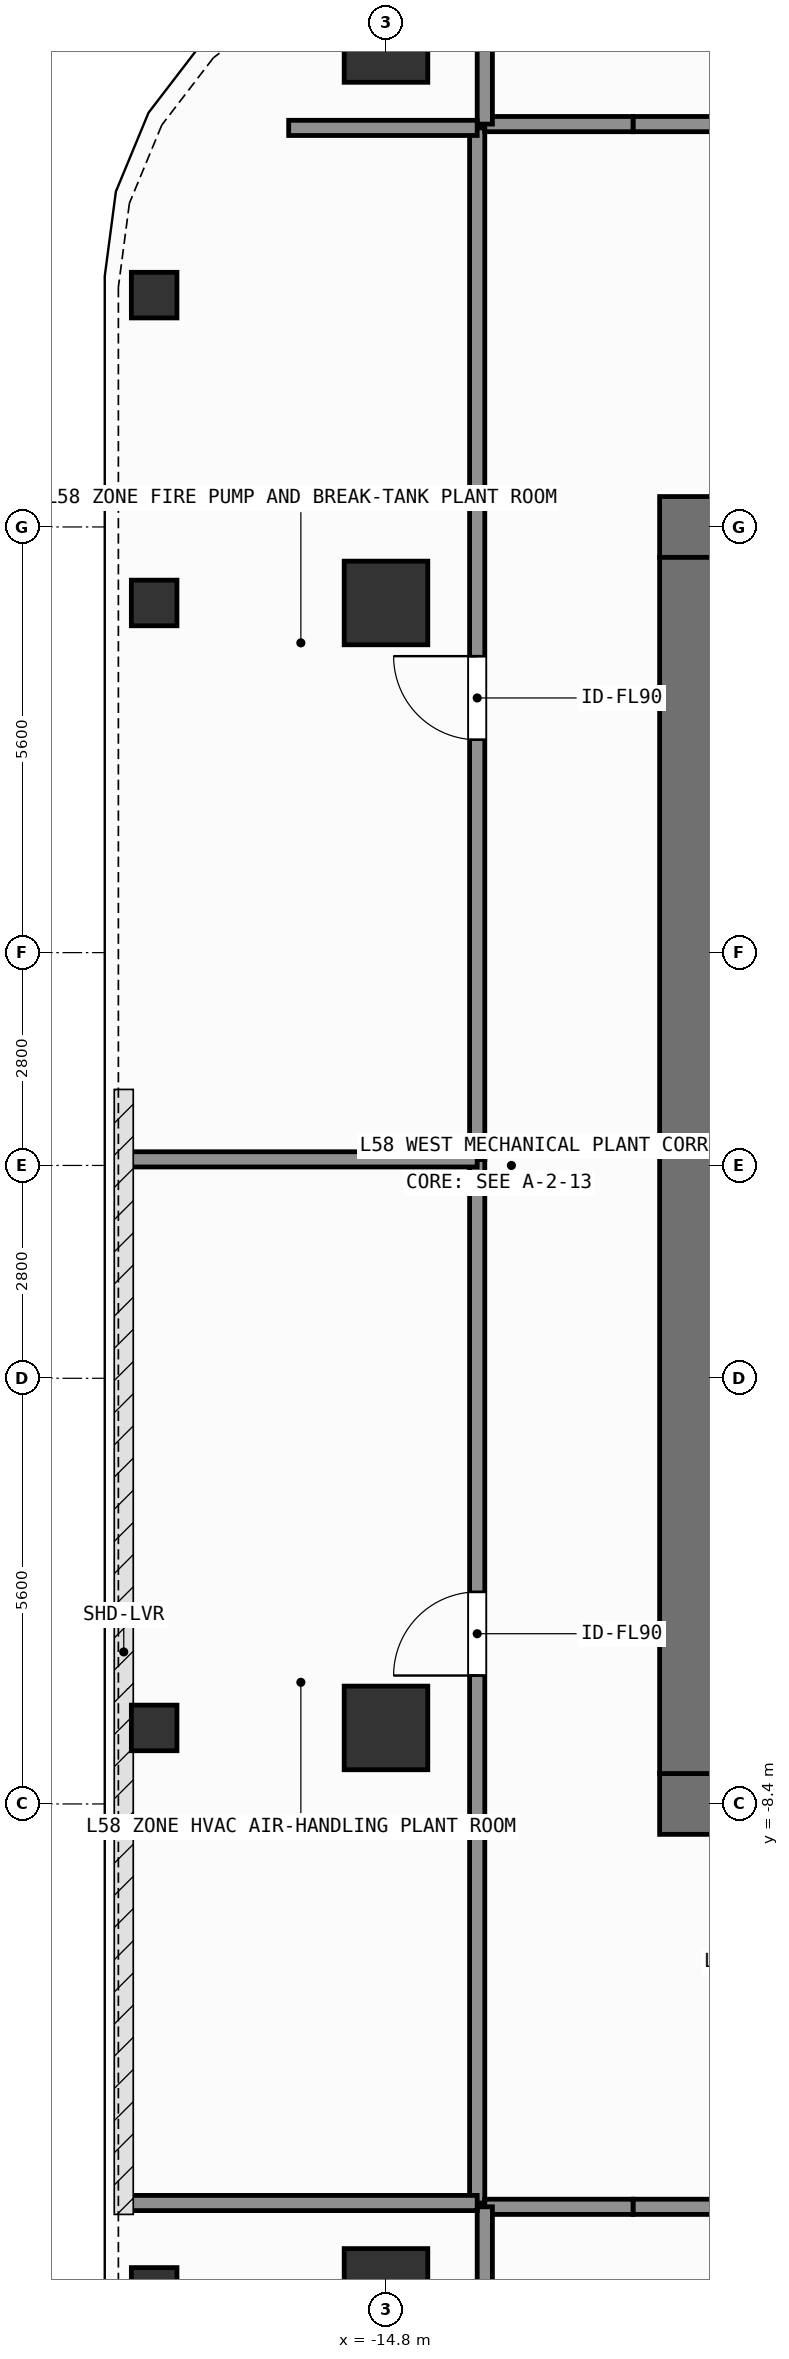
"""IFC4 building model, lengths in metres.
Left out: names, types, materials, properties, quantities, classifications, styles, units other than length and angle.
Written with IfcOpenShell. Run it as: python <this file> out.ifc"""

import sys

from ifc_helpers import new_model, si_unit, direction, frame, frame_2d, origin, origin_2d, place, context, subcontext, project, spatial, rectangle, hollow_rectangle, extrude, element, fill, save


model = new_model("IFC4")
c1 = context("Model", 3, precision=1e-05, world=origin(), true_north=direction((0.0, 1.0)))
c2 = subcontext(c1, "Body", "Model", "MODEL_VIEW")
j1 = project(units=[si_unit("LENGTHUNIT", "METRE"), si_unit("PLANEANGLEUNIT", "RADIAN")], contexts=[c1])
p1 = place(None, origin())
s1 = spatial("IfcSite", under=j1, at=p1, CompositionType="ELEMENT")
p2 = place(p1, origin())
s2 = spatial("IfcBuilding", under=s1, at=p2, CompositionType="ELEMENT")
p3 = place(p2, frame((0.0, 0.0, 235.2)))
s3 = spatial("IfcBuildingStorey", under=s2, at=p3, CompositionType="ELEMENT", Elevation=235.2)
for number, where, z_axis, x_axis in (
    (1, (-11.2, -8.4, 0.0), (0.0, 0.0, 1.0), (1.0, 0.0, 0.0)),
    (2, (-11.2, 8.4, 0.0), (0.0, 0.0, 1.0), (1.0, 0.0, 0.0)),
):
    element("IfcWall", number, at=place(p3, frame(where, z_axis=z_axis, x_axis=x_axis)), inside=s3, PredefinedType="SHEAR", context=c2, shape_type="SweptSolid", body=[
        extrude(rectangle(XDim=1.5, YDim=0.8, at=frame_2d((0.75, 0.0))), origin(), (0.0, 0.0, 1.0), 7.8),
    ])
p4 = place(p3, frame((-10.8, -8.0, 0.0), z_axis=(0.0, 0.0, 1.0), x_axis=(0.0, 1.0, 0.0)))
e3 = element("IfcWall", 3, at=p4, inside=s3, PredefinedType="SHEAR", context=c2, shape_type="SweptSolid", body=[
    extrude(rectangle(XDim=16.0, YDim=0.8, at=frame_2d((8.0, 0.0))), origin(), (0.0, 0.0, 1.0), 7.8),
])
for number, where, z_axis, x_axis in (
    (4, (-14.8, -14.8, 0.0), (0.0, 0.0, 1.0), (1.0, 0.0, 0.0)),
    (5, (-14.8, 14.8, 0.0), (0.0, 0.0, 1.0), (1.0, 0.0, 0.0)),
    (6, (-14.8, -7.4, 0.0), (0.0, 0.0, 1.0), (1.0, 0.0, 0.0)),
    (7, (-14.8, 7.4, 0.0), (0.0, 0.0, 1.0), (1.0, 0.0, 0.0)),
):
    element("IfcColumn", number, at=place(p3, frame(where, z_axis=z_axis, x_axis=x_axis)), inside=s3, PredefinedType="COLUMN", context=c2, shape_type="SweptSolid", body=[
        extrude(rectangle(XDim=1.1, YDim=1.1, at=origin_2d()), origin(), (0.0, 0.0, 1.0), 7.8),
    ])
for number, where, z_axis, x_axis in (
    (8, (-17.85, 11.45, 0.0), (0.0, 0.0, 1.0), (1.0, 0.0, 0.0)),
    (9, (-17.85, -14.8, 0.0), (0.0, 0.0, 1.0), (1.0, 0.0, 0.0)),
    (10, (-17.85, -7.4, 0.0), (0.0, 0.0, 1.0), (1.0, 0.0, 0.0)),
    (11, (-17.85, 7.4, 0.0), (0.0, 0.0, 1.0), (1.0, 0.0, 0.0)),
):
    element("IfcColumn", number, at=place(p3, frame(where, z_axis=z_axis, x_axis=x_axis)), inside=s3, PredefinedType="COLUMN", context=c2, shape_type="SweptSolid", body=[
        extrude(hollow_rectangle(XDim=0.6, YDim=0.6, WallThickness=0.028, at=origin_2d()), origin(), (0.0, 0.0, 1.0), 7.8),
    ])
p5 = place(p3, frame((-11.55, -13.7, 0.0), z_axis=(0.0, 0.0, 1.0), x_axis=(1.0, 0.0, 0.0)))
e12 = element("IfcWall", 12, at=p5, inside=s3, PredefinedType="SOLIDWALL", context=c2, shape_type="SweptSolid", body=[
    extrude(rectangle(XDim=27.15, YDim=0.2, at=frame_2d((13.575, 0.0))), origin(), (0.0, 0.0, 1.0), 7.58),
])
p6 = place(p5, frame((9.114, 0.0, 0.0)))
e13 = element("IfcOpeningElement", 13, at=p6, cuts=e12, PredefinedType="OPENING", context=c2, shape_type="SweptSolid", body=[
    extrude(rectangle(XDim=1.4, YDim=2.2, at=frame_2d((0.7, 1.1))), frame((0.0, 0.11, 0.0), z_axis=(0.0, -1.0, 0.0), x_axis=(1.0, 0.0, 0.0)), (0.0, 0.0, 1.0), 0.22),
])
p7 = place(p3, frame((-11.55, 13.7, 0.0), z_axis=(0.0, 0.0, 1.0), x_axis=(1.0, 0.0, 0.0)))
e14 = element("IfcWall", 14, at=p7, inside=s3, PredefinedType="SOLIDWALL", context=c2, shape_type="SweptSolid", body=[
    extrude(rectangle(XDim=27.15, YDim=0.2, at=frame_2d((13.575, 0.0))), origin(), (0.0, 0.0, 1.0), 7.58),
])
p8 = place(p7, frame((9.114, 0.0, 0.0)))
e15 = element("IfcOpeningElement", 15, at=p8, cuts=e14, PredefinedType="OPENING", context=c2, shape_type="SweptSolid", body=[
    extrude(rectangle(XDim=1.4, YDim=2.2, at=frame_2d((0.7, 1.1))), frame((0.0, 0.11, 0.0), z_axis=(0.0, -1.0, 0.0), x_axis=(1.0, 0.0, 0.0)), (0.0, 0.0, 1.0), 0.22),
])
p9 = place(p3, frame((-13.6, -13.65, 0.0), z_axis=(0.0, 0.0, 1.0), x_axis=(0.0, 1.0, 0.0)))
e16 = element("IfcWall", 16, at=p9, inside=s3, PredefinedType="SOLIDWALL", context=c2, shape_type="SweptSolid", body=[
    extrude(rectangle(XDim=13.73, YDim=0.2, at=frame_2d((6.865, 0.0))), origin(), (0.0, 0.0, 1.0), 7.58),
])
p10 = place(p9, frame((6.939, 0.0, 0.0)))
e17 = element("IfcOpeningElement", 17, at=p10, cuts=e16, PredefinedType="OPENING", context=c2, shape_type="SweptSolid", body=[
    extrude(rectangle(XDim=1.1, YDim=2.15, at=frame_2d((0.55, 1.075))), frame((0.0, 0.11, 0.0), z_axis=(0.0, -1.0, 0.0), x_axis=(1.0, 0.0, 0.0)), (0.0, 0.0, 1.0), 0.22),
])
p11 = place(p3, frame((-13.6, 0.08, 0.0), z_axis=(0.0, 0.0, 1.0), x_axis=(0.0, 1.0, 0.0)))
e18 = element("IfcWall", 18, at=p11, inside=s3, PredefinedType="SOLIDWALL", context=c2, shape_type="SweptSolid", body=[
    extrude(rectangle(XDim=13.57, YDim=0.2, at=frame_2d((6.785, 0.0))), origin(), (0.0, 0.0, 1.0), 7.58),
])
p12 = place(p11, frame((5.52, 0.0, 0.0)))
e19 = element("IfcOpeningElement", 19, at=p12, cuts=e18, PredefinedType="OPENING", context=c2, shape_type="SweptSolid", body=[
    extrude(rectangle(XDim=1.1, YDim=2.15, at=frame_2d((0.55, 1.075))), frame((0.0, 0.11, 0.0), z_axis=(0.0, -1.0, 0.0), x_axis=(1.0, 0.0, 0.0)), (0.0, 0.0, 1.0), 0.22),
])
for number, where, z_axis, x_axis in (
    (20, (-13.5, -13.7, 0.0), (0.0, 0.0, 1.0), (1.0, 0.0, 0.0)),
    (21, (-13.5, 13.7, 0.0), (0.0, 0.0, 1.0), (1.0, 0.0, 0.0)),
):
    element("IfcWall", number, at=place(p3, frame(where, z_axis=z_axis, x_axis=x_axis)), inside=s3, PredefinedType="SOLIDWALL", context=c2, shape_type="SweptSolid", body=[
        extrude(rectangle(XDim=1.95, YDim=0.2, at=frame_2d((0.975, 0.0))), origin(), (0.0, 0.0, 1.0), 7.58),
    ])
p13 = place(p3, frame((-13.5, -28.55, 0.0), z_axis=(0.0, 0.0, 1.0), x_axis=(0.0, 1.0, 0.0)))
e22 = element("IfcWall", 22, at=p13, inside=s3, PredefinedType="SOLIDWALL", context=c2, shape_type="SweptSolid", body=[
    extrude(rectangle(XDim=14.85, YDim=0.2, at=frame_2d((7.425, 0.0))), origin(), (0.0, 0.0, 1.0), 7.58),
])
p14 = place(p3, frame((-13.5, 13.7, 0.0), z_axis=(0.0, 0.0, 1.0), x_axis=(0.0, 1.0, 0.0)))
e23 = element("IfcWall", 23, at=p14, inside=s3, PredefinedType="SOLIDWALL", context=c2, shape_type="SweptSolid", body=[
    extrude(rectangle(XDim=2.05, YDim=0.2, at=frame_2d((1.025, 0.0))), origin(), (0.0, 0.0, 1.0), 7.58),
])
p15 = place(p3, frame((-18.25, -13.65, 0.0), z_axis=(0.0, 0.0, 1.0), x_axis=(1.0, 0.0, 0.0)))
e24 = element("IfcWall", 24, at=p15, inside=s3, PredefinedType="SOLIDWALL", context=c2, shape_type="SweptSolid", body=[
    extrude(rectangle(XDim=4.65, YDim=0.2, at=frame_2d((2.325, 0.0))), origin(), (0.0, 0.0, 1.0), 7.58),
])
p16 = place(p3, frame((-16.08, 13.65, 0.0), z_axis=(0.0, 0.0, 1.0), x_axis=(1.0, 0.0, 0.0)))
e25 = element("IfcWall", 25, at=p16, inside=s3, PredefinedType="SOLIDWALL", context=c2, shape_type="SweptSolid", body=[
    extrude(rectangle(XDim=2.48, YDim=0.2, at=frame_2d((1.24, 0.0))), origin(), (0.0, 0.0, 1.0), 7.58),
])
p17 = place(p3, frame((-18.25, 0.08, 0.0), z_axis=(0.0, 0.0, 1.0), x_axis=(1.0, 0.0, 0.0)))
e26 = element("IfcWall", 26, at=p17, inside=s3, PredefinedType="SOLIDWALL", context=c2, shape_type="SweptSolid", body=[
    extrude(rectangle(XDim=4.65, YDim=0.2, at=frame_2d((2.325, 0.0))), origin(), (0.0, 0.0, 1.0), 7.58),
])
p18 = place(p10, origin())
e27 = element("IfcDoor", 27, at=p18, inside=s3, OperationType="SINGLE_SWING_LEFT", PredefinedType="DOOR", context=c2, shape_type="SweptSolid", body=[
    extrude(rectangle(XDim=1.1, YDim=2.15, at=frame_2d((0.55, 1.075))), frame((0.0, 0.025, 0.0), z_axis=(0.0, -1.0, 0.0), x_axis=(1.0, 0.0, 0.0)), (0.0, 0.0, 1.0), 0.05),
])
fill(e17, e27)
p19 = place(p12, origin())
e28 = element("IfcDoor", 28, at=p19, inside=s3, OperationType="SINGLE_SWING_RIGHT", PredefinedType="DOOR", context=c2, shape_type="SweptSolid", body=[
    extrude(rectangle(XDim=1.1, YDim=2.15, at=frame_2d((0.55, 1.075))), frame((0.0, 0.025, 0.0), z_axis=(0.0, -1.0, 0.0), x_axis=(1.0, 0.0, 0.0)), (0.0, 0.0, 1.0), 0.05),
])
fill(e19, e28)
save(model, sys.argv[1])
